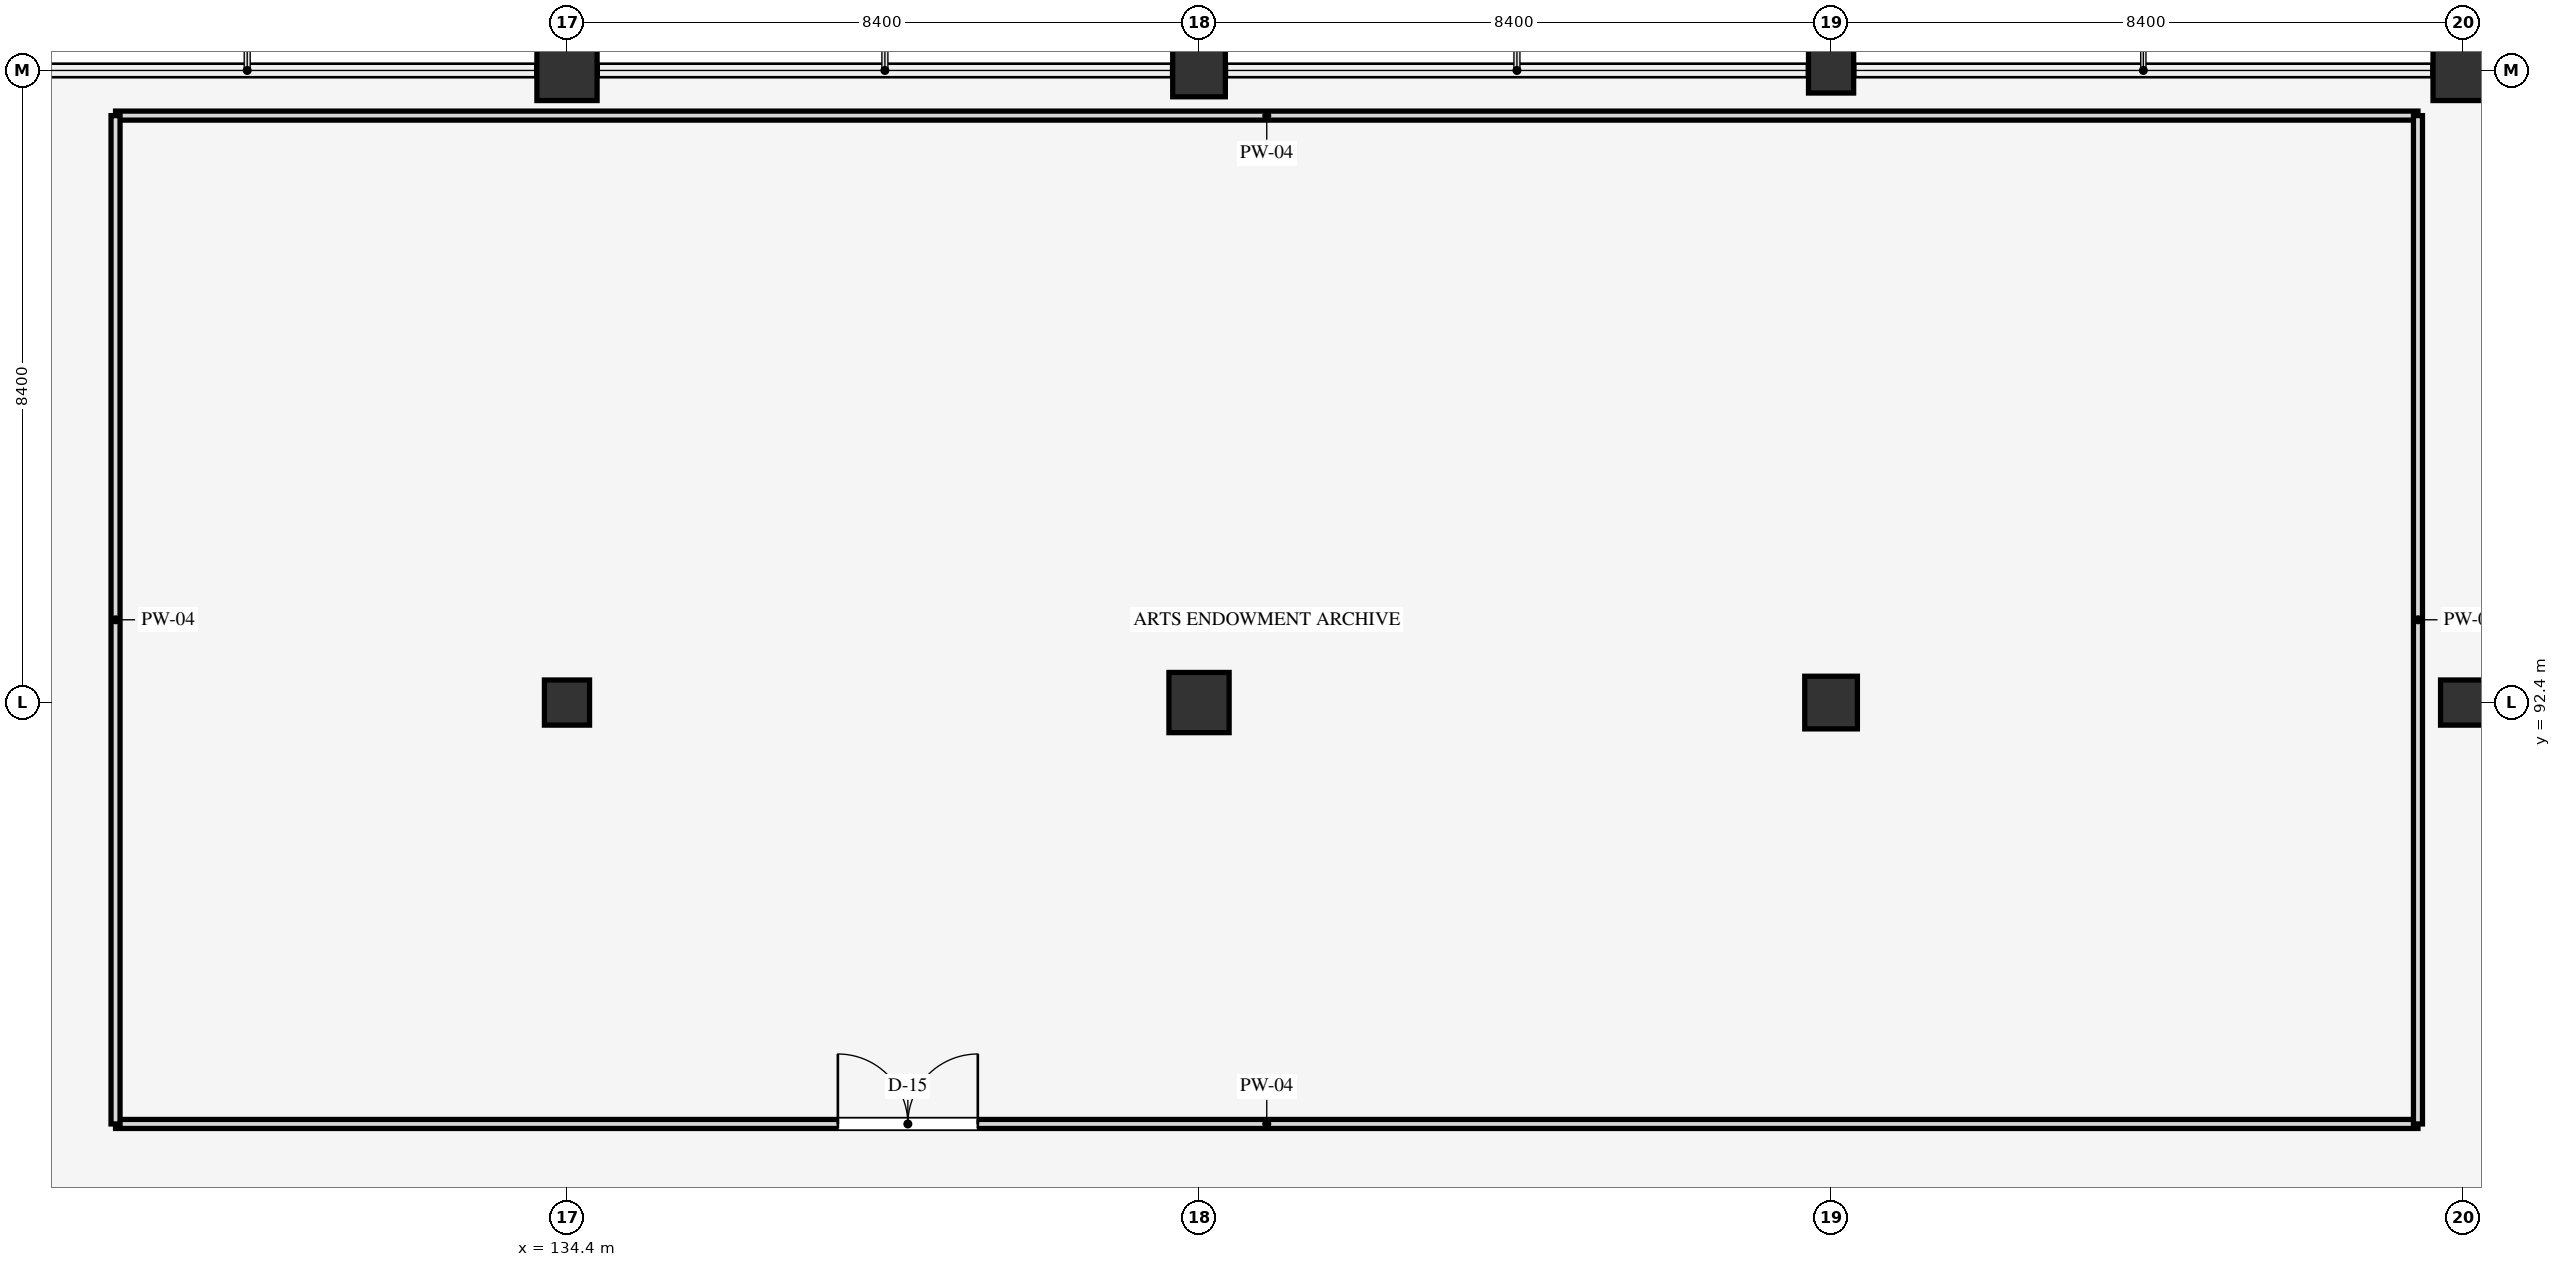
"""IFC4 building model, lengths in metres.
Left out: names, types, materials, properties, quantities, classifications, styles, units other than length and angle.
Written with IfcOpenShell. Run it as: python <this file> out.ifc"""

import sys

from ifc_helpers import new_model, si_unit, direction, frame, frame_2d, origin, origin_2d, place, context, subcontext, project, spatial, rectangle, extrude, element, fill, save


model = new_model("IFC4")
c1 = context("Model", 3, precision=1e-05, world=origin(), true_north=direction((0.0, 1.0)))
c2 = subcontext(c1, "Body", "Model", "MODEL_VIEW")
j1 = project(units=[si_unit("LENGTHUNIT", "METRE"), si_unit("PLANEANGLEUNIT", "RADIAN")], contexts=[c1])
p1 = place(None, origin())
s1 = spatial("IfcSite", under=j1, at=p1, CompositionType="ELEMENT")
p2 = place(p1, origin())
s2 = spatial("IfcBuilding", under=s1, at=p2, CompositionType="ELEMENT")
p3 = place(p2, frame((0.0, 0.0, 18.9)))
s3 = spatial("IfcBuildingStorey", under=s2, at=p3, CompositionType="ELEMENT", Elevation=18.9)
p4 = place(p3, frame((134.4, 92.4, 0.0), z_axis=(0.0, 0.0, 1.0), x_axis=(1.0, 0.0, 0.0)))
e1 = element("IfcColumn", 1, at=p4, inside=s3, PredefinedType="COLUMN", context=c2, shape_type="SweptSolid", body=[
    extrude(rectangle(XDim=0.6, YDim=0.6, at=origin_2d()), origin(), (0.0, 0.0, 1.0), 4.5),
])
for number, where, z_axis, x_axis in (
    (2, (134.4, 100.8, 0.0), (0.0, 0.0, 1.0), (1.0, 0.0, 0.0)),
    (3, (142.8, 92.4, 0.0), (0.0, 0.0, 1.0), (1.0, 0.0, 0.0)),
):
    element("IfcColumn", number, at=place(p3, frame(where, z_axis=z_axis, x_axis=x_axis)), inside=s3, PredefinedType="COLUMN", context=c2, shape_type="SweptSolid", body=[
        extrude(rectangle(XDim=0.8, YDim=0.8, at=origin_2d()), origin(), (0.0, 0.0, 1.0), 4.5),
    ])
for number, where, z_axis, x_axis in (
    (4, (142.8, 100.8, 0.0), (0.0, 0.0, 1.0), (1.0, 0.0, 0.0)),
    (5, (151.2, 92.4, 0.0), (0.0, 0.0, 1.0), (1.0, 0.0, 0.0)),
):
    element("IfcColumn", number, at=place(p3, frame(where, z_axis=z_axis, x_axis=x_axis)), inside=s3, PredefinedType="COLUMN", context=c2, shape_type="SweptSolid", body=[
        extrude(rectangle(XDim=0.7, YDim=0.7, at=origin_2d()), origin(), (0.0, 0.0, 1.0), 4.5),
    ])
for number, where, z_axis, x_axis in (
    (6, (151.2, 100.8, 0.0), (0.0, 0.0, 1.0), (1.0, 0.0, 0.0)),
    (7, (159.6, 92.4, 0.0), (0.0, 0.0, 1.0), (1.0, 0.0, 0.0)),
):
    element("IfcColumn", number, at=place(p3, frame(where, z_axis=z_axis, x_axis=x_axis)), inside=s3, PredefinedType="COLUMN", context=c2, shape_type="SweptSolid", body=[
        extrude(rectangle(XDim=0.6, YDim=0.6, at=origin_2d()), origin(), (0.0, 0.0, 1.0), 4.5),
    ])
p5 = place(p3, frame((159.6, 100.8, 0.0), z_axis=(0.0, 0.0, 1.0), x_axis=(1.0, 0.0, 0.0)))
e8 = element("IfcColumn", 8, at=p5, inside=s3, PredefinedType="COLUMN", context=c2, shape_type="SweptSolid", body=[
    extrude(rectangle(XDim=0.8, YDim=0.8, at=origin_2d()), origin(), (0.0, 0.0, 1.0), 4.5),
])
p6 = place(p3, frame((128.4, 86.8, 0.0), z_axis=(0.0, 0.0, 1.0), x_axis=(1.0, 0.0, 0.0)))
e9 = element("IfcWall", 9, at=p6, inside=s3, PredefinedType="PARTITIONING", context=c2, shape_type="SweptSolid", body=[
    extrude(rectangle(XDim=30.6, YDim=0.12, at=frame_2d((15.3, 0.0))), origin(), (0.0, 0.0, 1.0), 3.54),
])
p7 = place(p6, frame((9.6, 0.0, 0.0)))
e10 = element("IfcOpeningElement", 10, at=p7, cuts=e9, PredefinedType="OPENING", context=c2, shape_type="SweptSolid", body=[
    extrude(rectangle(XDim=1.86, YDim=2.26, at=frame_2d((0.93, 1.13))), frame((0.0, 0.07, 0.0), z_axis=(0.0, -1.0, 0.0), x_axis=(1.0, 0.0, 0.0)), (0.0, 0.0, 1.0), 0.14),
])
p8 = place(p3, frame((128.4, 100.2, 0.0), z_axis=(0.0, 0.0, 1.0), x_axis=(1.0, 0.0, 0.0)))
e11 = element("IfcWall", 11, at=p8, inside=s3, PredefinedType="PARTITIONING", context=c2, shape_type="SweptSolid", body=[
    extrude(rectangle(XDim=30.6, YDim=0.12, at=frame_2d((15.3, 0.0))), origin(), (0.0, 0.0, 1.0), 3.54),
])
for number, where, z_axis, x_axis in (
    (12, (128.4, 86.8, 0.0), (0.0, 0.0, 1.0), (0.0, 1.0, 0.0)),
    (13, (159.0, 86.8, 0.0), (0.0, 0.0, 1.0), (0.0, 1.0, 0.0)),
):
    element("IfcWall", number, at=place(p3, frame(where, z_axis=z_axis, x_axis=x_axis)), inside=s3, PredefinedType="PARTITIONING", context=c2, shape_type="SweptSolid", body=[
        extrude(rectangle(XDim=13.4, YDim=0.12, at=frame_2d((6.7, 0.0))), origin(), (0.0, 0.0, 1.0), 3.54),
    ])
p9 = place(p7, origin())
e14 = element("IfcDoor", 14, at=p9, inside=s3, OperationType="DOUBLE_DOOR_SINGLE_SWING", PredefinedType="DOOR", context=c2, shape_type="SweptSolid", body=[
    extrude(rectangle(XDim=1.86, YDim=2.26, at=frame_2d((0.93, 1.13))), frame((0.0, 0.025, 0.0), z_axis=(0.0, -1.0, 0.0), x_axis=(1.0, 0.0, 0.0)), (0.0, 0.0, 1.0), 0.05),
])
fill(e10, e14)
save(model, sys.argv[1])
